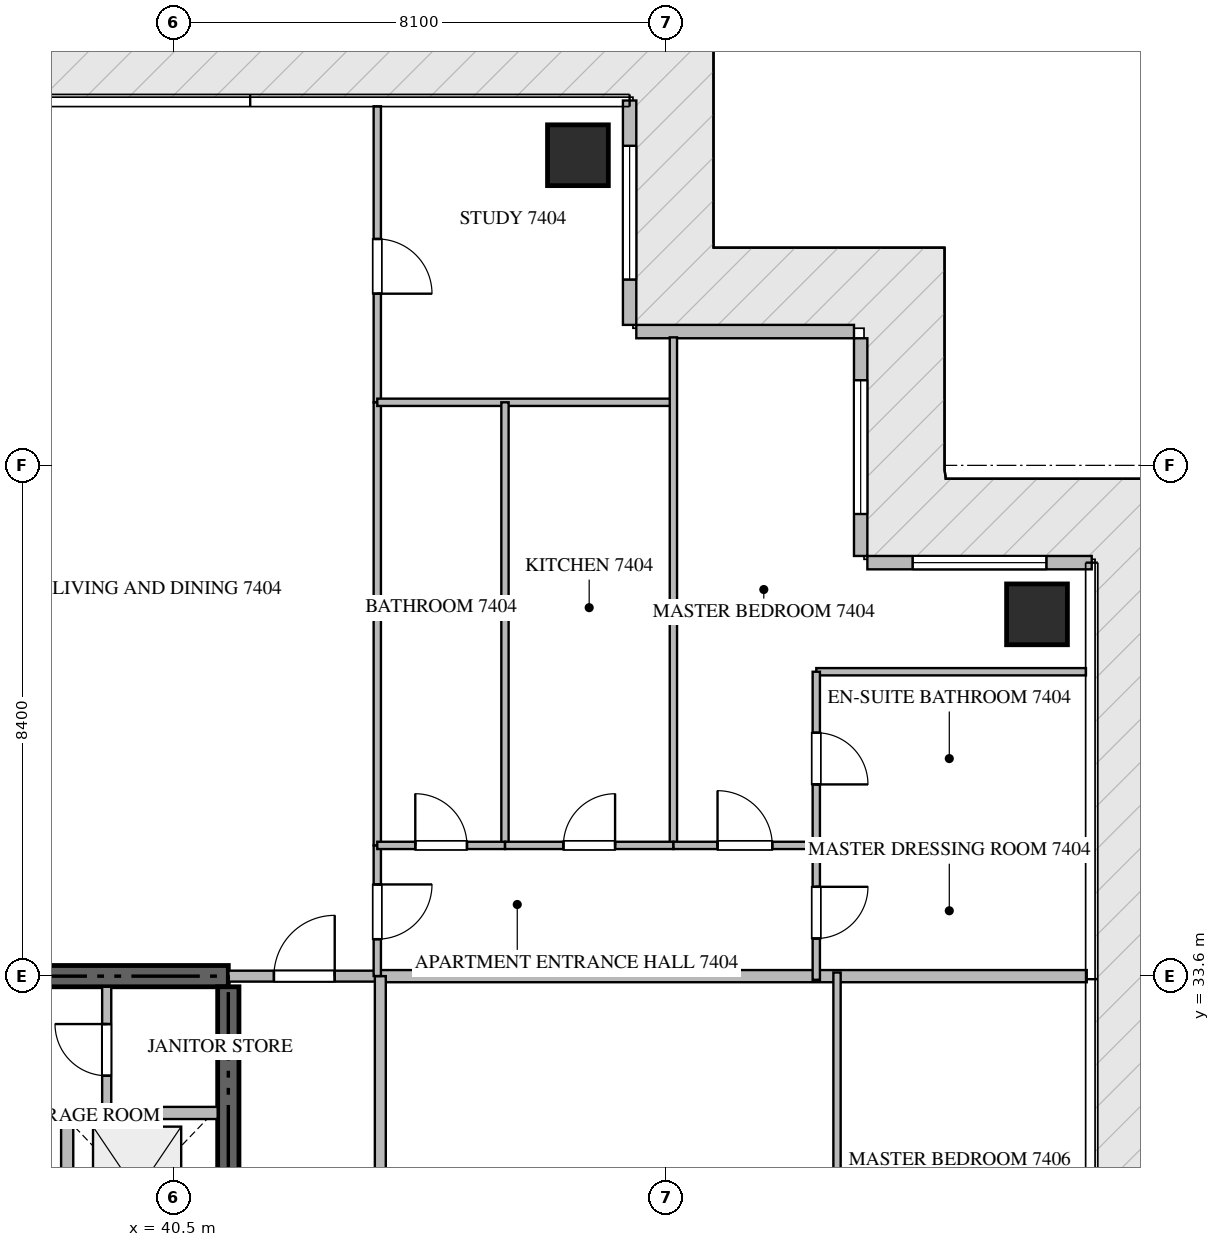
"""IFC4 building model, lengths in metres.
Left out: names, types, materials, properties, quantities, classifications, styles, units other than length and angle.
Written with IfcOpenShell. Run it as: python <this file> out.ifc"""

import sys

from ifc_helpers import new_model, si_unit, direction, frame, frame_2d, origin, origin_2d, place, context, subcontext, project, spatial, rectangle, extrude, source, transform, mapped, element, fill, save


model = new_model("IFC4")
c1 = context("Model", 3, precision=1e-05, world=origin(), true_north=direction((0.0, 1.0)))
c2 = subcontext(c1, "Body", "Model", "MODEL_VIEW")
j1 = project(units=[si_unit("LENGTHUNIT", "METRE"), si_unit("PLANEANGLEUNIT", "RADIAN")], contexts=[c1])
p1 = place(None, origin())
s1 = spatial("IfcSite", under=j1, at=p1, CompositionType="ELEMENT")
p2 = place(p1, origin())
s2 = spatial("IfcBuilding", under=s1, at=p2, CompositionType="ELEMENT")
p3 = place(p2, frame((0.0, 0.0, 297.5)))
s3 = spatial("IfcBuildingStorey", under=s2, at=p3, CompositionType="ELEMENT", Elevation=297.5)
p4 = place(p3, frame((41.4, 33.6, -0.26), z_axis=(0.0, 0.0, 1.0), x_axis=(-1.0, 0.0, 0.0)))
e1 = element("IfcWall", 1, at=p4, inside=s3, PredefinedType="SHEAR", context=c2, shape_type="SweptSolid", body=[
    extrude(rectangle(XDim=18.0, YDim=0.35, at=frame_2d((9.0, 0.0))), origin(), (0.0, 0.0, 1.0), 4.048),
])
p5 = place(p3, frame((41.4, 27.75, -0.26), z_axis=(0.0, 0.0, 1.0), x_axis=(0.0, 1.0, 0.0)))
e2 = element("IfcWall", 2, at=p5, inside=s3, PredefinedType="SHEAR", context=c2, shape_type="SweptSolid", body=[
    extrude(rectangle(XDim=5.675, YDim=0.35, at=frame_2d((2.837, 0.0))), origin(), (0.0, 0.0, 1.0), 4.048),
])
m1 = source(origin(), c2, "Body", "SweptSolid", [
    extrude(rectangle(XDim=1.0, YDim=1.0, at=origin_2d()), origin(), (0.0, 0.0, 1.0), 4.05),
])
for number, where, z_axis, x_axis in (
    (3, (47.15, 47.1, -0.26), (0.0, 0.0, 1.0), (1.0, 0.0, 0.0)),
    (4, (54.7, 39.55, -0.26), (0.0, 0.0, 1.0), (1.0, 0.0, 0.0)),
):
    element("IfcColumn", number, at=place(p3, frame(where, z_axis=z_axis, x_axis=x_axis)), inside=s3, PredefinedType="COLUMN", context=c2, shape_type="MappedRepresentation", body=[
        mapped(m1, transform((0.0, 0.0, 0.0), scale=1.0)),
    ])
p6 = place(p3, frame((55.6, 40.4, 0.0), z_axis=(0.0, 0.0, 1.0), x_axis=(-1.0, 0.0, 0.0)))
e5 = element("IfcWall", 5, at=p6, inside=s3, PredefinedType="ELEMENTEDWALL", context=c2, shape_type="SweptSolid", body=[
    extrude(rectangle(XDim=3.69, YDim=0.22, at=frame_2d((1.845, 0.0))), origin(), (0.0, 0.0, 1.0), 3.775),
])
p7 = place(p6, frame((0.745, 0.0, 0.65)))
e6 = element("IfcOpeningElement", 6, at=p7, cuts=e5, PredefinedType="OPENING", context=c2, shape_type="SweptSolid", body=[
    extrude(rectangle(XDim=2.2, YDim=2.4, at=frame_2d((1.1, 1.2))), frame((0.0, 0.12, 0.0), z_axis=(0.0, -1.0, 0.0), x_axis=(1.0, 0.0, 0.0)), (0.0, 0.0, 1.0), 0.24),
])
p8 = place(p3, frame((51.8, 40.51, 0.0), z_axis=(0.0, 0.0, 1.0), x_axis=(0.0, 1.0, 0.0)))
e7 = element("IfcWall", 7, at=p8, inside=s3, PredefinedType="ELEMENTEDWALL", context=c2, shape_type="SweptSolid", body=[
    extrude(rectangle(XDim=3.58, YDim=0.22, at=frame_2d((1.79, 0.0))), origin(), (0.0, 0.0, 1.0), 3.775),
])
p9 = place(p8, frame((0.69, 0.0, 0.65)))
e8 = element("IfcOpeningElement", 8, at=p9, cuts=e7, PredefinedType="OPENING", context=c2, shape_type="SweptSolid", body=[
    extrude(rectangle(XDim=2.2, YDim=2.4, at=frame_2d((1.1, 1.2))), frame((0.0, 0.12, 0.0), z_axis=(0.0, -1.0, 0.0), x_axis=(1.0, 0.0, 0.0)), (0.0, 0.0, 1.0), 0.24),
])
p10 = place(p3, frame((51.69, 44.2, 0.0), z_axis=(0.0, 0.0, 1.0), x_axis=(-1.0, 0.0, 0.0)))
e9 = element("IfcWall", 9, at=p10, inside=s3, PredefinedType="ELEMENTEDWALL", context=c2, shape_type="SweptSolid", body=[
    extrude(rectangle(XDim=3.58, YDim=0.22, at=frame_2d((1.79, 0.0))), origin(), (0.0, 0.0, 1.0), 3.775),
])
p11 = place(p3, frame((48.0, 44.31, 0.0), z_axis=(0.0, 0.0, 1.0), x_axis=(0.0, 1.0, 0.0)))
e10 = element("IfcWall", 10, at=p11, inside=s3, PredefinedType="ELEMENTEDWALL", context=c2, shape_type="SweptSolid", body=[
    extrude(rectangle(XDim=3.69, YDim=0.22, at=frame_2d((1.845, 0.0))), origin(), (0.0, 0.0, 1.0), 3.775),
])
p12 = place(p11, frame((0.745, 0.0, 0.65)))
e11 = element("IfcOpeningElement", 11, at=p12, cuts=e10, PredefinedType="OPENING", context=c2, shape_type="SweptSolid", body=[
    extrude(rectangle(XDim=2.2, YDim=2.4, at=frame_2d((1.1, 1.2))), frame((0.0, 0.12, 0.0), z_axis=(0.0, -1.0, 0.0), x_axis=(1.0, 0.0, 0.0)), (0.0, 0.0, 1.0), 0.24),
])
p13 = place(p3, frame((38.75, 28.85, 0.0), z_axis=(0.0, 0.0, 1.0), x_axis=(0.0, 1.0, 0.0)))
e12 = element("IfcWall", 12, at=p13, inside=s3, PredefinedType="STANDARD", context=c2, shape_type="SweptSolid", body=[
    extrude(rectangle(XDim=2.5, YDim=0.2, at=frame_2d((1.25, 0.0))), origin(), (0.0, 0.0, 1.0), 3.79),
])
p14 = place(p3, frame((38.75, 31.35, 0.0), z_axis=(0.0, 0.0, 1.0), x_axis=(1.0, 0.0, 0.0)))
e13 = element("IfcWall", 13, at=p14, inside=s3, PredefinedType="STANDARD", context=c2, shape_type="SweptSolid", body=[
    extrude(rectangle(XDim=2.475, YDim=0.2, at=frame_2d((1.238, 0.0))), origin(), (0.0, 0.0, 1.0), 3.79),
])
p15 = place(p3, frame((39.4, 31.35, 0.0), z_axis=(0.0, 0.0, 1.0), x_axis=(0.0, 1.0, 0.0)))
e14 = element("IfcWall", 14, at=p15, inside=s3, PredefinedType="PARTITIONING", context=c2, shape_type="SweptSolid", body=[
    extrude(rectangle(XDim=2.075, YDim=0.15, at=frame_2d((1.038, 0.0))), origin(), (0.0, 0.0, 1.0), 3.79),
])
p16 = place(p15, frame((0.612, 0.0, 0.0)))
e15 = element("IfcOpeningElement", 15, at=p16, cuts=e14, PredefinedType="OPENING", context=c2, shape_type="SweptSolid", body=[
    extrude(rectangle(XDim=0.85, YDim=2.1, at=frame_2d((0.425, 1.05))), frame((0.0, 0.085, 0.0), z_axis=(0.0, -1.0, 0.0), x_axis=(1.0, 0.0, 0.0)), (0.0, 0.0, 1.0), 0.17),
])
p17 = place(p3, frame((43.9, 33.6, 0.0), z_axis=(0.0, 0.0, 1.0), x_axis=(1.0, 0.0, 0.0)))
e16 = element("IfcWall", 16, at=p17, inside=s3, PredefinedType="PARTITIONING", context=c2, shape_type="SweptSolid", body=[
    extrude(rectangle(XDim=11.618, YDim=0.2, at=frame_2d((5.809, 0.0))), origin(), (0.0, 0.0, 1.0), 3.79),
])
p18 = place(p3, frame((41.402, 33.6, 0.0), z_axis=(0.0, 0.0, 1.0), x_axis=(1.0, 0.0, 0.0)))
e17 = element("IfcWall", 17, at=p18, inside=s3, PredefinedType="PARTITIONING", context=c2, shape_type="SweptSolid", body=[
    extrude(rectangle(XDim=2.496, YDim=0.18, at=frame_2d((1.248, 0.0))), origin(), (0.0, 0.0, 1.0), 3.79),
])
p19 = place(p18, frame((0.748, 0.0, 0.0)))
e18 = element("IfcOpeningElement", 18, at=p19, cuts=e17, PredefinedType="OPENING", context=c2, shape_type="SweptSolid", body=[
    extrude(rectangle(XDim=1.0, YDim=2.15, at=frame_2d((0.5, 1.075))), frame((0.0, 0.1, 0.0), z_axis=(0.0, -1.0, 0.0), x_axis=(1.0, 0.0, 0.0)), (0.0, 0.0, 1.0), 0.2),
])
p20 = place(p3, frame((43.9, 16.8, 0.0), z_axis=(0.0, 0.0, 1.0), x_axis=(0.0, 1.0, 0.0)))
e19 = element("IfcWall", 19, at=p20, inside=s3, PredefinedType="PARTITIONING", context=c2, shape_type="SweptSolid", body=[
    extrude(rectangle(XDim=16.8, YDim=0.18, at=frame_2d((8.4, 0.0))), origin(), (0.0, 0.0, 1.0), 3.79),
])
p21 = place(p20, frame((1.3, 0.0, 0.0)))
e20 = element("IfcOpeningElement", 20, at=p21, cuts=e19, PredefinedType="OPENING", context=c2, shape_type="SweptSolid", body=[
    extrude(rectangle(XDim=1.0, YDim=2.15, at=frame_2d((0.5, 1.075))), frame((0.0, 0.1, 0.0), z_axis=(0.0, -1.0, 0.0), x_axis=(1.0, 0.0, 0.0)), (0.0, 0.0, 1.0), 0.2),
])
p22 = place(p3, frame((43.85, 35.75, 0.0), z_axis=(0.0, 0.0, 1.0), x_axis=(0.0, -1.0, 0.0)))
e21 = element("IfcWall", 21, at=p22, inside=s3, PredefinedType="PARTITIONING", context=c2, shape_type="SweptSolid", body=[
    extrude(rectangle(XDim=2.148, YDim=0.12, at=frame_2d((1.074, 0.0))), origin(), (0.0, 0.0, 1.0), 3.79),
])
p23 = place(p22, frame((0.642, 0.0, 0.0)))
e22 = element("IfcOpeningElement", 22, at=p23, cuts=e21, PredefinedType="OPENING", context=c2, shape_type="SweptSolid", body=[
    extrude(rectangle(XDim=0.9, YDim=2.1, at=frame_2d((0.45, 1.05))), frame((0.0, 0.07, 0.0), z_axis=(0.0, -1.0, 0.0), x_axis=(1.0, 0.0, 0.0)), (0.0, 0.0, 1.0), 0.14),
])
p24 = place(p3, frame((43.85, 47.905, 0.0), z_axis=(0.0, 0.0, 1.0), x_axis=(0.0, -1.0, 0.0)))
e23 = element("IfcWall", 23, at=p24, inside=s3, PredefinedType="PARTITIONING", context=c2, shape_type="SweptSolid", body=[
    extrude(rectangle(XDim=4.868, YDim=0.12, at=frame_2d((2.434, 0.0))), origin(), (0.0, 0.0, 1.0), 3.79),
])
p25 = place(p24, frame((2.182, 0.0, 0.0)))
e24 = element("IfcOpeningElement", 24, at=p25, cuts=e23, PredefinedType="OPENING", context=c2, shape_type="SweptSolid", body=[
    extrude(rectangle(XDim=0.9, YDim=2.1, at=frame_2d((0.45, 1.05))), frame((0.0, 0.07, 0.0), z_axis=(0.0, -1.0, 0.0), x_axis=(1.0, 0.0, 0.0)), (0.0, 0.0, 1.0), 0.14),
])
p26 = place(p3, frame((43.85, 43.035, 0.0), z_axis=(0.0, 0.0, 1.0), x_axis=(0.0, -1.0, 0.0)))
e25 = element("IfcWall", 25, at=p26, inside=s3, PredefinedType="PARTITIONING", context=c2, shape_type="SweptSolid", body=[
    extrude(rectangle(XDim=7.283, YDim=0.12, at=frame_2d((3.642, 0.0))), origin(), (0.0, 0.0, 1.0), 3.79),
])
p27 = place(p3, frame((43.85, 43.037, 0.0), z_axis=(0.0, 0.0, 1.0), x_axis=(1.0, 0.0, 0.0)))
e26 = element("IfcWall", 26, at=p27, inside=s3, PredefinedType="PARTITIONING", context=c2, shape_type="SweptSolid", body=[
    extrude(rectangle(XDim=4.87, YDim=0.12, at=frame_2d((2.435, 0.0))), origin(), (0.0, 0.0, 1.0), 3.79),
])
p28 = place(p3, frame((48.72, 44.105, 0.0), z_axis=(0.0, 0.0, 1.0), x_axis=(0.0, -1.0, 0.0)))
e27 = element("IfcWall", 27, at=p28, inside=s3, PredefinedType="PARTITIONING", context=c2, shape_type="SweptSolid", body=[
    extrude(rectangle(XDim=8.355, YDim=0.12, at=frame_2d((4.177, 0.0))), origin(), (0.0, 0.0, 1.0), 3.79),
])
p29 = place(p3, frame((45.95, 43.037, 0.0), z_axis=(0.0, 0.0, 1.0), x_axis=(0.0, -1.0, 0.0)))
e28 = element("IfcWall", 28, at=p29, inside=s3, PredefinedType="PARTITIONING", context=c2, shape_type="SweptSolid", body=[
    extrude(rectangle(XDim=7.287, YDim=0.12, at=frame_2d((3.644, 0.0))), origin(), (0.0, 0.0, 1.0), 3.79),
])
p30 = place(p3, frame((43.85, 35.75, 0.0), z_axis=(0.0, 0.0, 1.0), x_axis=(1.0, 0.0, 0.0)))
e29 = element("IfcWall", 29, at=p30, inside=s3, PredefinedType="PARTITIONING", context=c2, shape_type="SweptSolid", body=[
    extrude(rectangle(XDim=2.1, YDim=0.12, at=frame_2d((1.05, 0.0))), origin(), (0.0, 0.0, 1.0), 3.79),
])
p31 = place(p30, frame((0.625, 0.0, 0.0)))
e30 = element("IfcOpeningElement", 30, at=p31, cuts=e29, PredefinedType="OPENING", context=c2, shape_type="SweptSolid", body=[
    extrude(rectangle(XDim=0.85, YDim=2.1, at=frame_2d((0.425, 1.05))), frame((0.0, 0.07, 0.0), z_axis=(0.0, -1.0, 0.0), x_axis=(1.0, 0.0, 0.0)), (0.0, 0.0, 1.0), 0.14),
])
p32 = place(p3, frame((45.952, 35.75, 0.0), z_axis=(0.0, 0.0, 1.0), x_axis=(1.0, 0.0, 0.0)))
e31 = element("IfcWall", 31, at=p32, inside=s3, PredefinedType="PARTITIONING", context=c2, shape_type="SweptSolid", body=[
    extrude(rectangle(XDim=2.768, YDim=0.12, at=frame_2d((1.384, 0.0))), origin(), (0.0, 0.0, 1.0), 3.79),
])
p33 = place(p32, frame((0.959, 0.0, 0.0)))
e32 = element("IfcOpeningElement", 32, at=p33, cuts=e31, PredefinedType="OPENING", context=c2, shape_type="SweptSolid", body=[
    extrude(rectangle(XDim=0.85, YDim=2.1, at=frame_2d((0.425, 1.05))), frame((0.0, 0.07, 0.0), z_axis=(0.0, -1.0, 0.0), x_axis=(1.0, 0.0, 0.0)), (0.0, 0.0, 1.0), 0.14),
])
p34 = place(p3, frame((48.722, 35.75, 0.0), z_axis=(0.0, 0.0, 1.0), x_axis=(1.0, 0.0, 0.0)))
e33 = element("IfcWall", 33, at=p34, inside=s3, PredefinedType="PARTITIONING", context=c2, shape_type="SweptSolid", body=[
    extrude(rectangle(XDim=2.348, YDim=0.12, at=frame_2d((1.174, 0.0))), origin(), (0.0, 0.0, 1.0), 3.79),
])
p35 = place(p34, frame((0.724, 0.0, 0.0)))
e34 = element("IfcOpeningElement", 34, at=p35, cuts=e33, PredefinedType="OPENING", context=c2, shape_type="SweptSolid", body=[
    extrude(rectangle(XDim=0.9, YDim=2.1, at=frame_2d((0.45, 1.05))), frame((0.0, 0.07, 0.0), z_axis=(0.0, -1.0, 0.0), x_axis=(1.0, 0.0, 0.0)), (0.0, 0.0, 1.0), 0.14),
])
p36 = place(p3, frame((51.07, 38.606, 0.0), z_axis=(0.0, 0.0, 1.0), x_axis=(1.0, 0.0, 0.0)))
e35 = element("IfcWall", 35, at=p36, inside=s3, PredefinedType="PARTITIONING", context=c2, shape_type="SweptSolid", body=[
    extrude(rectangle(XDim=4.435, YDim=0.12, at=frame_2d((2.217, 0.0))), origin(), (0.0, 0.0, 1.0), 3.79),
])
p37 = place(p3, frame((51.072, 35.75, 0.0), z_axis=(0.0, 0.0, 1.0), x_axis=(1.0, 0.0, 0.0)))
e36 = element("IfcWall", 36, at=p37, inside=s3, PredefinedType="PARTITIONING", context=c2, shape_type="SweptSolid", body=[
    extrude(rectangle(XDim=4.433, YDim=0.12, at=frame_2d((2.216, 0.0))), origin(), (0.0, 0.0, 1.0), 3.79),
])
p38 = place(p3, frame((51.07, 38.606, 0.0), z_axis=(0.0, 0.0, 1.0), x_axis=(0.0, -1.0, 0.0)))
e37 = element("IfcWall", 37, at=p38, inside=s3, PredefinedType="PARTITIONING", context=c2, shape_type="SweptSolid", body=[
    extrude(rectangle(XDim=2.856, YDim=0.12, at=frame_2d((1.428, 0.0))), origin(), (0.0, 0.0, 1.0), 3.79),
])
p39 = place(p38, frame((1.003, 0.0, 0.0)))
e38 = element("IfcOpeningElement", 38, at=p39, cuts=e37, PredefinedType="OPENING", context=c2, shape_type="SweptSolid", body=[
    extrude(rectangle(XDim=0.85, YDim=2.1, at=frame_2d((0.425, 1.05))), frame((0.0, 0.07, 0.0), z_axis=(0.0, -1.0, 0.0), x_axis=(1.0, 0.0, 0.0)), (0.0, 0.0, 1.0), 0.14),
])
p40 = place(p3, frame((51.07, 35.748, 0.0), z_axis=(0.0, 0.0, 1.0), x_axis=(0.0, -1.0, 0.0)))
e39 = element("IfcWall", 39, at=p40, inside=s3, PredefinedType="PARTITIONING", context=c2, shape_type="SweptSolid", body=[
    extrude(rectangle(XDim=2.208, YDim=0.12, at=frame_2d((1.104, 0.0))), origin(), (0.0, 0.0, 1.0), 3.79),
])
p41 = place(p40, frame((0.679, 0.0, 0.0)))
e40 = element("IfcOpeningElement", 40, at=p41, cuts=e39, PredefinedType="OPENING", context=c2, shape_type="SweptSolid", body=[
    extrude(rectangle(XDim=0.85, YDim=2.1, at=frame_2d((0.425, 1.05))), frame((0.0, 0.07, 0.0), z_axis=(0.0, -1.0, 0.0), x_axis=(1.0, 0.0, 0.0)), (0.0, 0.0, 1.0), 0.14),
])
p42 = place(p3, frame((51.411, 23.18, 0.0), z_axis=(0.0, 0.0, 1.0), x_axis=(0.0, 1.0, 0.0)))
e41 = element("IfcWall", 41, at=p42, inside=s3, PredefinedType="PARTITIONING", context=c2, shape_type="SweptSolid", body=[
    extrude(rectangle(XDim=10.48, YDim=0.12, at=frame_2d((5.24, 0.0))), origin(), (0.0, 0.0, 1.0), 3.79),
])
m2 = source(origin(), c2, "Body", "SweptSolid", [
    extrude(rectangle(XDim=2.2, YDim=2.4, at=frame_2d((1.1, 1.2))), frame((0.0, 0.03, 0.0), z_axis=(0.0, -1.0, 0.0), x_axis=(1.0, 0.0, 0.0)), (0.0, 0.0, 1.0), 0.06),
])
p43 = place(p7, origin())
e42 = element("IfcWindow", 42, at=p43, inside=s3, PartitioningType="SINGLE_PANEL", PredefinedType="WINDOW", context=c2, shape_type="MappedRepresentation", body=[
    mapped(m2, transform((0.0, 0.0, 0.0), scale=1.0)),
])
fill(e6, e42)
p44 = place(p9, origin())
e43 = element("IfcWindow", 43, at=p44, inside=s3, PartitioningType="SINGLE_PANEL", PredefinedType="WINDOW", context=c2, shape_type="MappedRepresentation", body=[
    mapped(m2, transform((0.0, 0.0, 0.0), scale=1.0)),
])
fill(e8, e43)
p45 = place(p12, origin())
e44 = element("IfcWindow", 44, at=p45, inside=s3, PartitioningType="SINGLE_PANEL", PredefinedType="WINDOW", context=c2, shape_type="MappedRepresentation", body=[
    mapped(m2, transform((0.0, 0.0, 0.0), scale=1.0)),
])
fill(e11, e44)
m3 = source(origin(), c2, "Body", "SweptSolid", [
    extrude(rectangle(XDim=0.85, YDim=2.1, at=frame_2d((0.425, 1.05))), frame((0.0, 0.025, 0.0), z_axis=(0.0, -1.0, 0.0), x_axis=(1.0, 0.0, 0.0)), (0.0, 0.0, 1.0), 0.05),
])
p46 = place(p16, origin())
e45 = element("IfcDoor", 45, at=p46, inside=s3, OperationType="SINGLE_SWING_RIGHT", PredefinedType="DOOR", context=c2, shape_type="MappedRepresentation", body=[
    mapped(m3, transform((0.0, 0.0, 0.0), scale=1.0)),
])
fill(e15, e45)
m4 = source(origin(), c2, "Body", "SweptSolid", [
    extrude(rectangle(XDim=1.0, YDim=2.15, at=frame_2d((0.5, 1.075))), frame((0.0, 0.025, 0.0), z_axis=(0.0, -1.0, 0.0), x_axis=(1.0, 0.0, 0.0)), (0.0, 0.0, 1.0), 0.05),
])
p47 = place(p19, origin())
e46 = element("IfcDoor", 46, at=p47, inside=s3, OperationType="SINGLE_SWING_RIGHT", PredefinedType="DOOR", context=c2, shape_type="MappedRepresentation", body=[
    mapped(m4, transform((0.0, 0.0, 0.0), scale=1.0)),
])
fill(e18, e46)
m5 = source(origin(), c2, "Body", "SweptSolid", [
    extrude(rectangle(XDim=0.9, YDim=2.1, at=frame_2d((0.45, 1.05))), frame((0.0, 0.025, 0.0), z_axis=(0.0, -1.0, 0.0), x_axis=(1.0, 0.0, 0.0)), (0.0, 0.0, 1.0), 0.05),
])
p48 = place(p23, origin())
e47 = element("IfcDoor", 47, at=p48, inside=s3, OperationType="SINGLE_SWING_LEFT", PredefinedType="DOOR", context=c2, shape_type="MappedRepresentation", body=[
    mapped(m5, transform((0.0, 0.0, 0.0), scale=1.0)),
])
fill(e22, e47)
p49 = place(p25, origin())
e48 = element("IfcDoor", 48, at=p49, inside=s3, OperationType="SINGLE_SWING_RIGHT", PredefinedType="DOOR", context=c2, shape_type="MappedRepresentation", body=[
    mapped(m5, transform((0.0, 0.0, 0.0), scale=1.0)),
])
fill(e24, e48)
p50 = place(p31, origin())
e49 = element("IfcDoor", 49, at=p50, inside=s3, OperationType="SINGLE_SWING_LEFT", PredefinedType="DOOR", context=c2, shape_type="MappedRepresentation", body=[
    mapped(m3, transform((0.0, 0.0, 0.0), scale=1.0)),
])
fill(e30, e49)
p51 = place(p33, origin())
e50 = element("IfcDoor", 50, at=p51, inside=s3, OperationType="SINGLE_SWING_RIGHT", PredefinedType="DOOR", context=c2, shape_type="MappedRepresentation", body=[
    mapped(m3, transform((0.0, 0.0, 0.0), scale=1.0)),
])
fill(e32, e50)
p52 = place(p35, origin())
e51 = element("IfcDoor", 51, at=p52, inside=s3, OperationType="SINGLE_SWING_LEFT", PredefinedType="DOOR", context=c2, shape_type="MappedRepresentation", body=[
    mapped(m5, transform((0.0, 0.0, 0.0), scale=1.0)),
])
fill(e34, e51)
p53 = place(p39, origin())
e52 = element("IfcDoor", 52, at=p53, inside=s3, OperationType="SINGLE_SWING_RIGHT", PredefinedType="DOOR", context=c2, shape_type="MappedRepresentation", body=[
    mapped(m3, transform((0.0, 0.0, 0.0), scale=1.0)),
])
fill(e38, e52)
p54 = place(p41, origin())
e53 = element("IfcDoor", 53, at=p54, inside=s3, OperationType="SINGLE_SWING_LEFT", PredefinedType="DOOR", context=c2, shape_type="MappedRepresentation", body=[
    mapped(m3, transform((0.0, 0.0, 0.0), scale=1.0)),
])
fill(e40, e53)
save(model, sys.argv[1])
